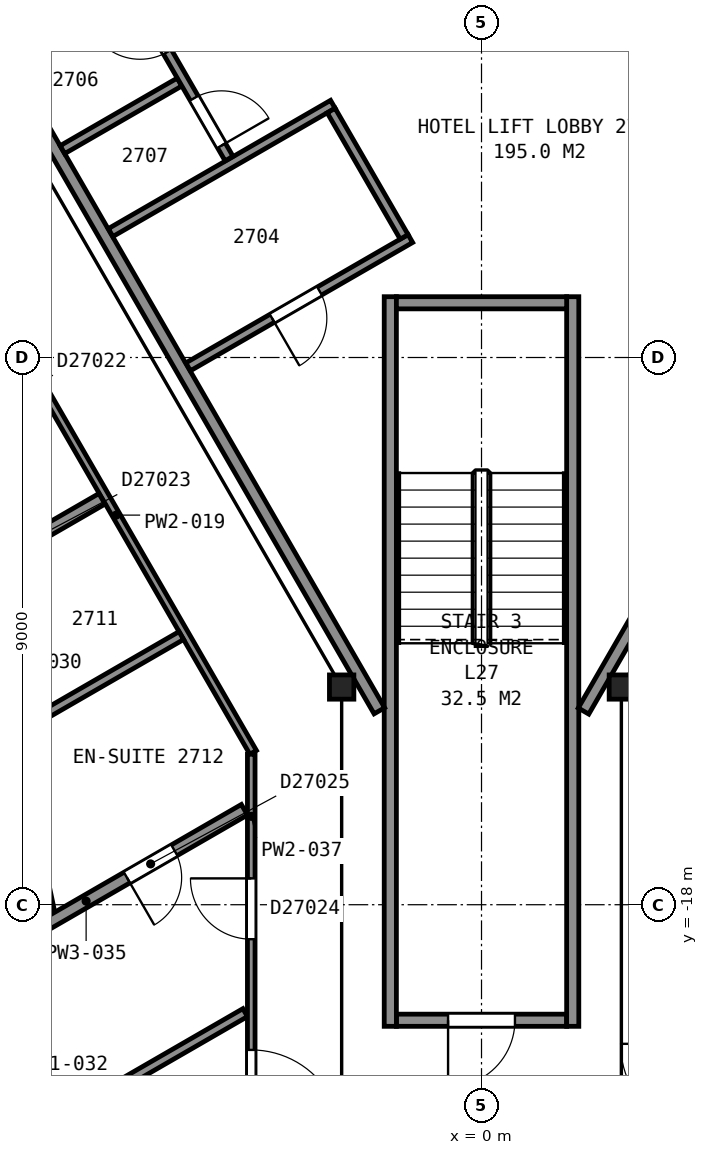
"""IFC4 building model, lengths in metres.
Left out: names, types, materials, properties, quantities, classifications, styles, units other than length and angle.
Written with IfcOpenShell. Run it as: python <this file> out.ifc"""

import sys

from ifc_helpers import new_model, si_unit, direction, frame, frame_2d, origin, origin_2d, place, context, subcontext, project, spatial, rectangle, i_section, extrude, element, fill, save


model = new_model("IFC4")
c1 = context("Model", 3, precision=1e-05, world=origin(), true_north=direction((0.0, 1.0)))
c2 = subcontext(c1, "Body", "Model", "MODEL_VIEW")
j1 = project(units=[si_unit("LENGTHUNIT", "METRE"), si_unit("PLANEANGLEUNIT", "RADIAN")], contexts=[c1])
p1 = place(None, origin())
s1 = spatial("IfcSite", under=j1, at=p1, CompositionType="ELEMENT")
p2 = place(p1, origin())
s2 = spatial("IfcBuilding", under=s1, at=p2, CompositionType="ELEMENT")
p3 = place(p2, frame((0.0, 0.0, 114.4)))
s3 = spatial("IfcBuildingStorey", under=s2, at=p3, CompositionType="ELEMENT", Elevation=114.4)
for number, where, z_axis, x_axis in (
    (1, (-2.3, -14.42, 0.0), (0.0, 0.0, 1.0), (1.0, 0.0, 0.0)),
    (2, (2.3, -14.42, 0.0), (0.0, 0.0, 1.0), (1.0, 0.0, 0.0)),
):
    element("IfcColumn", number, at=place(p3, frame(where, z_axis=z_axis, x_axis=x_axis)), inside=s3, PredefinedType="COLUMN", context=c2, shape_type="SweptSolid", body=[
        extrude(i_section(OverallWidth=0.401, OverallDepth=0.399, WebThickness=0.025, FlangeThickness=0.04, FilletRadius=0.015, at=origin_2d()), origin(), (0.0, 0.0, 1.0), 3.6),
    ])
p4 = place(p3, frame((-1.4, -19.9, 0.0), z_axis=(0.0, 0.0, 1.0), x_axis=(1.0, 0.0, 0.0)))
e3 = element("IfcWall", 3, at=p4, inside=s3, PredefinedType="PARTITIONING", context=c2, shape_type="SweptSolid", body=[
    extrude(rectangle(XDim=2.8, YDim=0.2, at=frame_2d((1.4, 0.0))), origin(), (0.0, 0.0, 1.0), 3.35),
])
p5 = place(p4, frame((0.85, 0.0, 0.0)))
e4 = element("IfcOpeningElement", 4, at=p5, cuts=e3, PredefinedType="OPENING", context=c2, shape_type="SweptSolid", body=[
    extrude(rectangle(XDim=1.1, YDim=2.1, at=frame_2d((0.55, 1.05))), frame((0.0, 0.11, 0.0), z_axis=(0.0, -1.0, 0.0), x_axis=(1.0, 0.0, 0.0)), (0.0, 0.0, 1.0), 0.22),
])
for number, where, z_axis, x_axis in (
    (5, (1.5, -8.0, 0.0), (0.0, 0.0, 1.0), (0.0, -1.0, 0.0)),
    (6, (-1.5, -8.0, 0.0), (0.0, 0.0, 1.0), (0.0, -1.0, 0.0)),
):
    element("IfcWall", number, at=place(p3, frame(where, z_axis=z_axis, x_axis=x_axis)), inside=s3, PredefinedType="PARTITIONING", context=c2, shape_type="SweptSolid", body=[
        extrude(rectangle(XDim=12.0, YDim=0.2, at=frame_2d((6.0, 0.0))), origin(), (0.0, 0.0, 1.0), 3.35),
    ])
p6 = place(p3, frame((-1.4, -8.1, 0.0), z_axis=(0.0, 0.0, 1.0), x_axis=(1.0, 0.0, 0.0)))
e7 = element("IfcWall", 7, at=p6, inside=s3, PredefinedType="PARTITIONING", context=c2, shape_type="SweptSolid", body=[
    extrude(rectangle(XDim=2.8, YDim=0.2, at=frame_2d((1.4, 0.0))), origin(), (0.0, 0.0, 1.0), 3.35),
])
p7 = place(p3, frame((-13.664, 5.946, 0.0), z_axis=(0.0, 0.0, 1.0), x_axis=(0.499994327219, -0.866028678941, 0.0)))
e8 = element("IfcWall", 8, at=p7, inside=s3, PredefinedType="PARTITIONING", context=c2, shape_type="SweptSolid", body=[
    extrude(rectangle(XDim=23.968, YDim=0.2, at=frame_2d((11.984, 0.0))), origin(), (0.0, 0.0, 1.0), 3.35),
])
p8 = place(p3, frame((-7.856, -3.912, 0.0), z_axis=(0.0, 0.0, 1.0), x_axis=(0.865971748, 0.500092923031, 0.0)))
e9 = element("IfcWall", 9, at=p8, inside=s3, PredefinedType="PARTITIONING", context=c2, shape_type="SweptSolid", body=[
    extrude(rectangle(XDim=2.225, YDim=0.15, at=frame_2d((1.112, 0.0))), origin(), (0.0, 0.0, 1.0), 3.35),
])
p9 = place(p3, frame((-6.892, -5.582, 0.0), z_axis=(0.0, 0.0, 1.0), x_axis=(0.865944298464, 0.500140452231, 0.0)))
e10 = element("IfcWall", 10, at=p9, inside=s3, PredefinedType="PARTITIONING", context=c2, shape_type="SweptSolid", body=[
    extrude(rectangle(XDim=2.224, YDim=0.15, at=frame_2d((1.112, 0.0))), origin(), (0.0, 0.0, 1.0), 3.35),
])
p10 = place(p3, frame((-6.1, -6.946, 0.0), z_axis=(0.0, 0.0, 1.0), x_axis=(0.866038200431, 0.499977834903, 0.0)))
e11 = element("IfcWall", 11, at=p10, inside=s3, PredefinedType="PARTITIONING", context=c2, shape_type="SweptSolid", body=[
    extrude(rectangle(XDim=4.22, YDim=0.15, at=frame_2d((2.11, 0.0))), origin(), (0.0, 0.0, 1.0), 3.35),
])
p11 = place(p3, frame((-4.152, -5.729, 0.0), z_axis=(0.0, 0.0, 1.0), x_axis=(-0.500024287448, 0.866011380966, 0.0)))
e12 = element("IfcWall", 12, at=p11, inside=s3, PredefinedType="PARTITIONING", context=c2, shape_type="SweptSolid", body=[
    extrude(rectangle(XDim=3.501, YDim=0.15, at=frame_2d((1.75, 0.0))), origin(), (0.0, 0.0, 1.0), 3.35),
])
p12 = place(p11, frame((2.026, 0.0, 0.0)))
e13 = element("IfcOpeningElement", 13, at=p12, cuts=e12, PredefinedType="OPENING", context=c2, shape_type="SweptSolid", body=[
    extrude(rectangle(XDim=0.9, YDim=2.1, at=frame_2d((0.45, 1.05))), frame((0.0, 0.085, 0.0), z_axis=(0.0, -1.0, 0.0), x_axis=(1.0, 0.0, 0.0)), (0.0, 0.0, 1.0), 0.17),
])
p13 = place(p11, frame((0.248, 0.0, 0.0)))
e14 = element("IfcOpeningElement", 14, at=p13, cuts=e12, PredefinedType="OPENING", context=c2, shape_type="SweptSolid", body=[
    extrude(rectangle(XDim=0.9, YDim=2.1, at=frame_2d((0.45, 1.05))), frame((0.0, 0.085, 0.0), z_axis=(0.0, -1.0, 0.0), x_axis=(1.0, 0.0, 0.0)), (0.0, 0.0, 1.0), 0.17),
])
p14 = place(p3, frame((-4.825, -9.154, 0.0), z_axis=(0.0, 0.0, 1.0), x_axis=(0.866023738697, 0.500002884005, 0.0)))
e15 = element("IfcWall", 15, at=p14, inside=s3, PredefinedType="PARTITIONING", context=c2, shape_type="SweptSolid", body=[
    extrude(rectangle(XDim=4.22, YDim=0.15, at=frame_2d((2.11, 0.0))), origin(), (0.0, 0.0, 1.0), 3.35),
])
p15 = place(p14, frame((1.595, 0.0, 0.0)))
e16 = element("IfcOpeningElement", 16, at=p15, cuts=e15, PredefinedType="OPENING", context=c2, shape_type="SweptSolid", body=[
    extrude(rectangle(XDim=0.9, YDim=2.1, at=frame_2d((0.45, 1.05))), frame((0.0, 0.085, 0.0), z_axis=(0.0, -1.0, 0.0), x_axis=(1.0, 0.0, 0.0)), (0.0, 0.0, 1.0), 0.17),
])
p16 = place(p3, frame((-2.472, -4.938, 0.0), z_axis=(0.0, 0.0, 1.0), x_axis=(0.500045362686, -0.865999212041, 0.0)))
e17 = element("IfcWall", 17, at=p16, inside=s3, PredefinedType="PARTITIONING", context=c2, shape_type="SweptSolid", body=[
    extrude(rectangle(XDim=2.4, YDim=0.15, at=frame_2d((1.2, 0.0))), origin(), (0.0, 0.0, 1.0), 3.35),
])
p17 = place(p3, frame((1.677, -14.815, 0.0), z_axis=(0.0, 0.0, 1.0), x_axis=(0.49999445743, 0.866028603765, 0.0)))
e18 = element("IfcWall", 18, at=p17, inside=s3, PredefinedType="PARTITIONING", context=c2, shape_type="SweptSolid", body=[
    extrude(rectangle(XDim=5.905, YDim=0.2, at=frame_2d((2.952, 0.0))), origin(), (0.0, 0.0, 1.0), 3.35),
])
p18 = place(p17, frame((3.855, 0.0, 0.0)))
e19 = element("IfcOpeningElement", 19, at=p18, cuts=e18, PredefinedType="OPENING", context=c2, shape_type="SweptSolid", body=[
    extrude(rectangle(XDim=1.8, YDim=2.1, at=frame_2d((0.9, 1.05))), frame((0.0, 0.11, 0.0), z_axis=(0.0, -1.0, 0.0), x_axis=(1.0, 0.0, 0.0)), (0.0, 0.0, 1.0), 0.22),
])
p19 = place(p3, frame((-3.756, -15.494, 0.0), z_axis=(0.0, 0.0, 1.0), x_axis=(-0.500027787016, 0.866009360349, 0.0)))
e20 = element("IfcWall", 20, at=p19, inside=s3, PredefinedType="PARTITIONING", context=c2, shape_type="SweptSolid", body=[
    extrude(rectangle(XDim=23.856, YDim=0.125, at=frame_2d((11.928, 0.0))), origin(), (0.0, 0.0, 1.0), 2.613),
])
p20 = place(p19, frame((22.393, 0.0, 0.0)))
e21 = element("IfcOpeningElement", 21, at=p20, cuts=e20, PredefinedType="OPENING", context=c2, shape_type="SweptSolid", body=[
    extrude(rectangle(XDim=1.0, YDim=2.1, at=frame_2d((0.5, 1.05))), frame((0.0, 0.073, 0.0), z_axis=(0.0, -1.0, 0.0), x_axis=(1.0, 0.0, 0.0)), (0.0, 0.0, 1.0), 0.145),
])
p21 = place(p19, frame((12.996, 0.0, 0.0)))
e22 = element("IfcOpeningElement", 22, at=p21, cuts=e20, PredefinedType="OPENING", context=c2, shape_type="SweptSolid", body=[
    extrude(rectangle(XDim=0.9, YDim=2.1, at=frame_2d((0.45, 1.05))), frame((0.0, 0.073, 0.0), z_axis=(0.0, -1.0, 0.0), x_axis=(1.0, 0.0, 0.0)), (0.0, 0.0, 1.0), 0.145),
])
p22 = place(p19, frame((9.011, 0.0, 0.0)))
e23 = element("IfcOpeningElement", 23, at=p22, cuts=e20, PredefinedType="OPENING", context=c2, shape_type="SweptSolid", body=[
    extrude(rectangle(XDim=1.0, YDim=2.1, at=frame_2d((0.5, 1.05))), frame((0.0, 0.073, 0.0), z_axis=(0.0, -1.0, 0.0), x_axis=(1.0, 0.0, 0.0)), (0.0, 0.0, 1.0), 0.145),
])
p23 = place(p3, frame((-11.304, -17.25, 0.0), z_axis=(0.0, 0.0, 1.0), x_axis=(0.86600919026, 0.500028081597, 0.0)))
e24 = element("IfcWall", 24, at=p23, inside=s3, PredefinedType="PARTITIONING", context=c2, shape_type="SweptSolid", body=[
    extrude(rectangle(XDim=7.353, YDim=0.15, at=frame_2d((3.676, 0.0))), origin(), (0.0, 0.0, 1.0), 2.613),
])
p24 = place(p3, frame((-6.241, -11.324, 0.0), z_axis=(0.0, 0.0, 1.0), x_axis=(-0.866003189247, -0.500038474733, 0.0)))
e25 = element("IfcWall", 25, at=p24, inside=s3, PredefinedType="PARTITIONING", context=c2, shape_type="SweptSolid", body=[
    extrude(rectangle(XDim=3.232, YDim=0.2, at=frame_2d((1.616, 0.0))), origin(), (0.0, 0.0, 1.0), 2.613),
])
p25 = place(p24, frame((1.132, 0.0, 0.0)))
e26 = element("IfcOpeningElement", 26, at=p25, cuts=e25, PredefinedType="OPENING", context=c2, shape_type="SweptSolid", body=[
    extrude(rectangle(XDim=0.8, YDim=2.1, at=frame_2d((0.4, 1.05))), frame((0.0, 0.11, 0.0), z_axis=(0.0, -1.0, 0.0), x_axis=(1.0, 0.0, 0.0)), (0.0, 0.0, 1.0), 0.22),
])
p26 = place(p3, frame((-8.357, -22.355, 0.0), z_axis=(0.0, 0.0, 1.0), x_axis=(0.866060346521, 0.499939472521, 0.0)))
e27 = element("IfcWall", 27, at=p26, inside=s3, PredefinedType="PARTITIONING", context=c2, shape_type="SweptSolid", body=[
    extrude(rectangle(XDim=5.161, YDim=0.15, at=frame_2d((2.581, 0.0))), origin(), (0.0, 0.0, 1.0), 2.613),
])
p27 = place(p3, frame((-7.718, -15.301, 0.0), z_axis=(0.0, 0.0, 1.0), x_axis=(0.207306745071, -0.978275990428, 0.0)))
e28 = element("IfcWall", 28, at=p27, inside=s3, PredefinedType="PARTITIONING", context=c2, shape_type="SweptSolid", body=[
    extrude(rectangle(XDim=2.904, YDim=0.2, at=frame_2d((1.452, 0.0))), origin(), (0.0, 0.0, 1.0), 2.613),
])
p28 = place(p3, frame((-7.174, -18.329, 0.0), z_axis=(0.0, 0.0, 1.0), x_axis=(0.865937163705, 0.500152805165, 0.0)))
e29 = element("IfcWall", 29, at=p28, inside=s3, PredefinedType="PARTITIONING", context=c2, shape_type="SweptSolid", body=[
    extrude(rectangle(XDim=3.781, YDim=0.2, at=frame_2d((1.891, 0.0))), origin(), (0.0, 0.0, 1.0), 2.613),
])
p29 = place(p28, frame((1.55, 0.0, 0.0)))
e30 = element("IfcOpeningElement", 30, at=p29, cuts=e29, PredefinedType="OPENING", context=c2, shape_type="SweptSolid", body=[
    extrude(rectangle(XDim=0.9, YDim=2.1, at=frame_2d((0.45, 1.05))), frame((0.0, 0.11, 0.0), z_axis=(0.0, -1.0, 0.0), x_axis=(1.0, 0.0, 0.0)), (0.0, 0.0, 1.0), 0.22),
])
p30 = place(p3, frame((-3.787, -22.673, 0.0), z_axis=(0.0, 0.0, 1.0), x_axis=(0.0, 1.0, 0.0)))
e31 = element("IfcWall", 31, at=p30, inside=s3, PredefinedType="PARTITIONING", context=c2, shape_type="SweptSolid", body=[
    extrude(rectangle(XDim=7.148, YDim=0.125, at=frame_2d((3.574, 0.0))), origin(), (0.0, 0.0, 1.0), 2.613),
])
p31 = place(p30, frame((4.106, 0.0, 0.0)))
e32 = element("IfcOpeningElement", 32, at=p31, cuts=e31, PredefinedType="OPENING", context=c2, shape_type="SweptSolid", body=[
    extrude(rectangle(XDim=1.0, YDim=2.1, at=frame_2d((0.5, 1.05))), frame((0.0, 0.073, 0.0), z_axis=(0.0, -1.0, 0.0), x_axis=(1.0, 0.0, 0.0)), (0.0, 0.0, 1.0), 0.145),
])
p32 = place(p30, frame((0.785, 0.0, 0.0)))
e33 = element("IfcOpeningElement", 33, at=p32, cuts=e31, PredefinedType="OPENING", context=c2, shape_type="SweptSolid", body=[
    extrude(rectangle(XDim=1.5, YDim=2.1, at=frame_2d((0.75, 1.05))), frame((0.0, 0.073, 0.0), z_axis=(0.0, -1.0, 0.0), x_axis=(1.0, 0.0, 0.0)), (0.0, 0.0, 1.0), 0.145),
])
p33 = place(p5, origin())
e34 = element("IfcDoor", 34, at=p33, inside=s3, OperationType="SINGLE_SWING_LEFT", PredefinedType="DOOR", context=c2, shape_type="SweptSolid", body=[
    extrude(rectangle(XDim=1.1, YDim=2.1, at=frame_2d((0.55, 1.05))), frame((0.0, 0.025, 0.0), z_axis=(0.0, -1.0, 0.0), x_axis=(1.0, 0.0, 0.0)), (0.0, 0.0, 1.0), 0.05),
])
fill(e4, e34)
p34 = place(p12, origin())
e35 = element("IfcDoor", 35, at=p34, inside=s3, OperationType="SINGLE_SWING_RIGHT", PredefinedType="DOOR", context=c2, shape_type="SweptSolid", body=[
    extrude(rectangle(XDim=0.9, YDim=2.1, at=frame_2d((0.45, 1.05))), frame((0.0, 0.025, 0.0), z_axis=(0.0, -1.0, 0.0), x_axis=(1.0, 0.0, 0.0)), (0.0, 0.0, 1.0), 0.05),
])
fill(e13, e35)
p35 = place(p13, origin())
e36 = element("IfcDoor", 36, at=p35, inside=s3, OperationType="SINGLE_SWING_LEFT", PredefinedType="DOOR", context=c2, shape_type="SweptSolid", body=[
    extrude(rectangle(XDim=0.9, YDim=2.1, at=frame_2d((0.45, 1.05))), frame((0.0, 0.025, 0.0), z_axis=(0.0, -1.0, 0.0), x_axis=(1.0, 0.0, 0.0)), (0.0, 0.0, 1.0), 0.05),
])
fill(e14, e36)
p36 = place(p15, origin())
e37 = element("IfcDoor", 37, at=p36, inside=s3, OperationType="SINGLE_SWING_LEFT", PredefinedType="DOOR", context=c2, shape_type="SweptSolid", body=[
    extrude(rectangle(XDim=0.9, YDim=2.1, at=frame_2d((0.45, 1.05))), frame((0.0, 0.025, 0.0), z_axis=(0.0, -1.0, 0.0), x_axis=(1.0, 0.0, 0.0)), (0.0, 0.0, 1.0), 0.05),
])
fill(e16, e37)
p37 = place(p29, origin())
e38 = element("IfcDoor", 38, at=p37, inside=s3, OperationType="SINGLE_SWING_LEFT", PredefinedType="DOOR", context=c2, shape_type="SweptSolid", body=[
    extrude(rectangle(XDim=0.9, YDim=2.1, at=frame_2d((0.45, 1.05))), frame((0.0, 0.025, 0.0), z_axis=(0.0, -1.0, 0.0), x_axis=(1.0, 0.0, 0.0)), (0.0, 0.0, 1.0), 0.05),
])
fill(e30, e38)
p38 = place(p31, origin())
e39 = element("IfcDoor", 39, at=p38, inside=s3, OperationType="SINGLE_SWING_RIGHT", PredefinedType="DOOR", context=c2, shape_type="SweptSolid", body=[
    extrude(rectangle(XDim=1.0, YDim=2.1, at=frame_2d((0.5, 1.05))), frame((0.0, 0.025, 0.0), z_axis=(0.0, -1.0, 0.0), x_axis=(1.0, 0.0, 0.0)), (0.0, 0.0, 1.0), 0.05),
])
fill(e32, e39)
p39 = place(p32, origin())
e40 = element("IfcDoor", 40, at=p39, inside=s3, OperationType="DOUBLE_DOOR_SINGLE_SWING", PredefinedType="DOOR", context=c2, shape_type="SweptSolid", body=[
    extrude(rectangle(XDim=1.5, YDim=2.1, at=frame_2d((0.75, 1.05))), frame((0.0, 0.025, 0.0), z_axis=(0.0, -1.0, 0.0), x_axis=(1.0, 0.0, 0.0)), (0.0, 0.0, 1.0), 0.05),
])
fill(e33, e40)
save(model, sys.argv[1])
